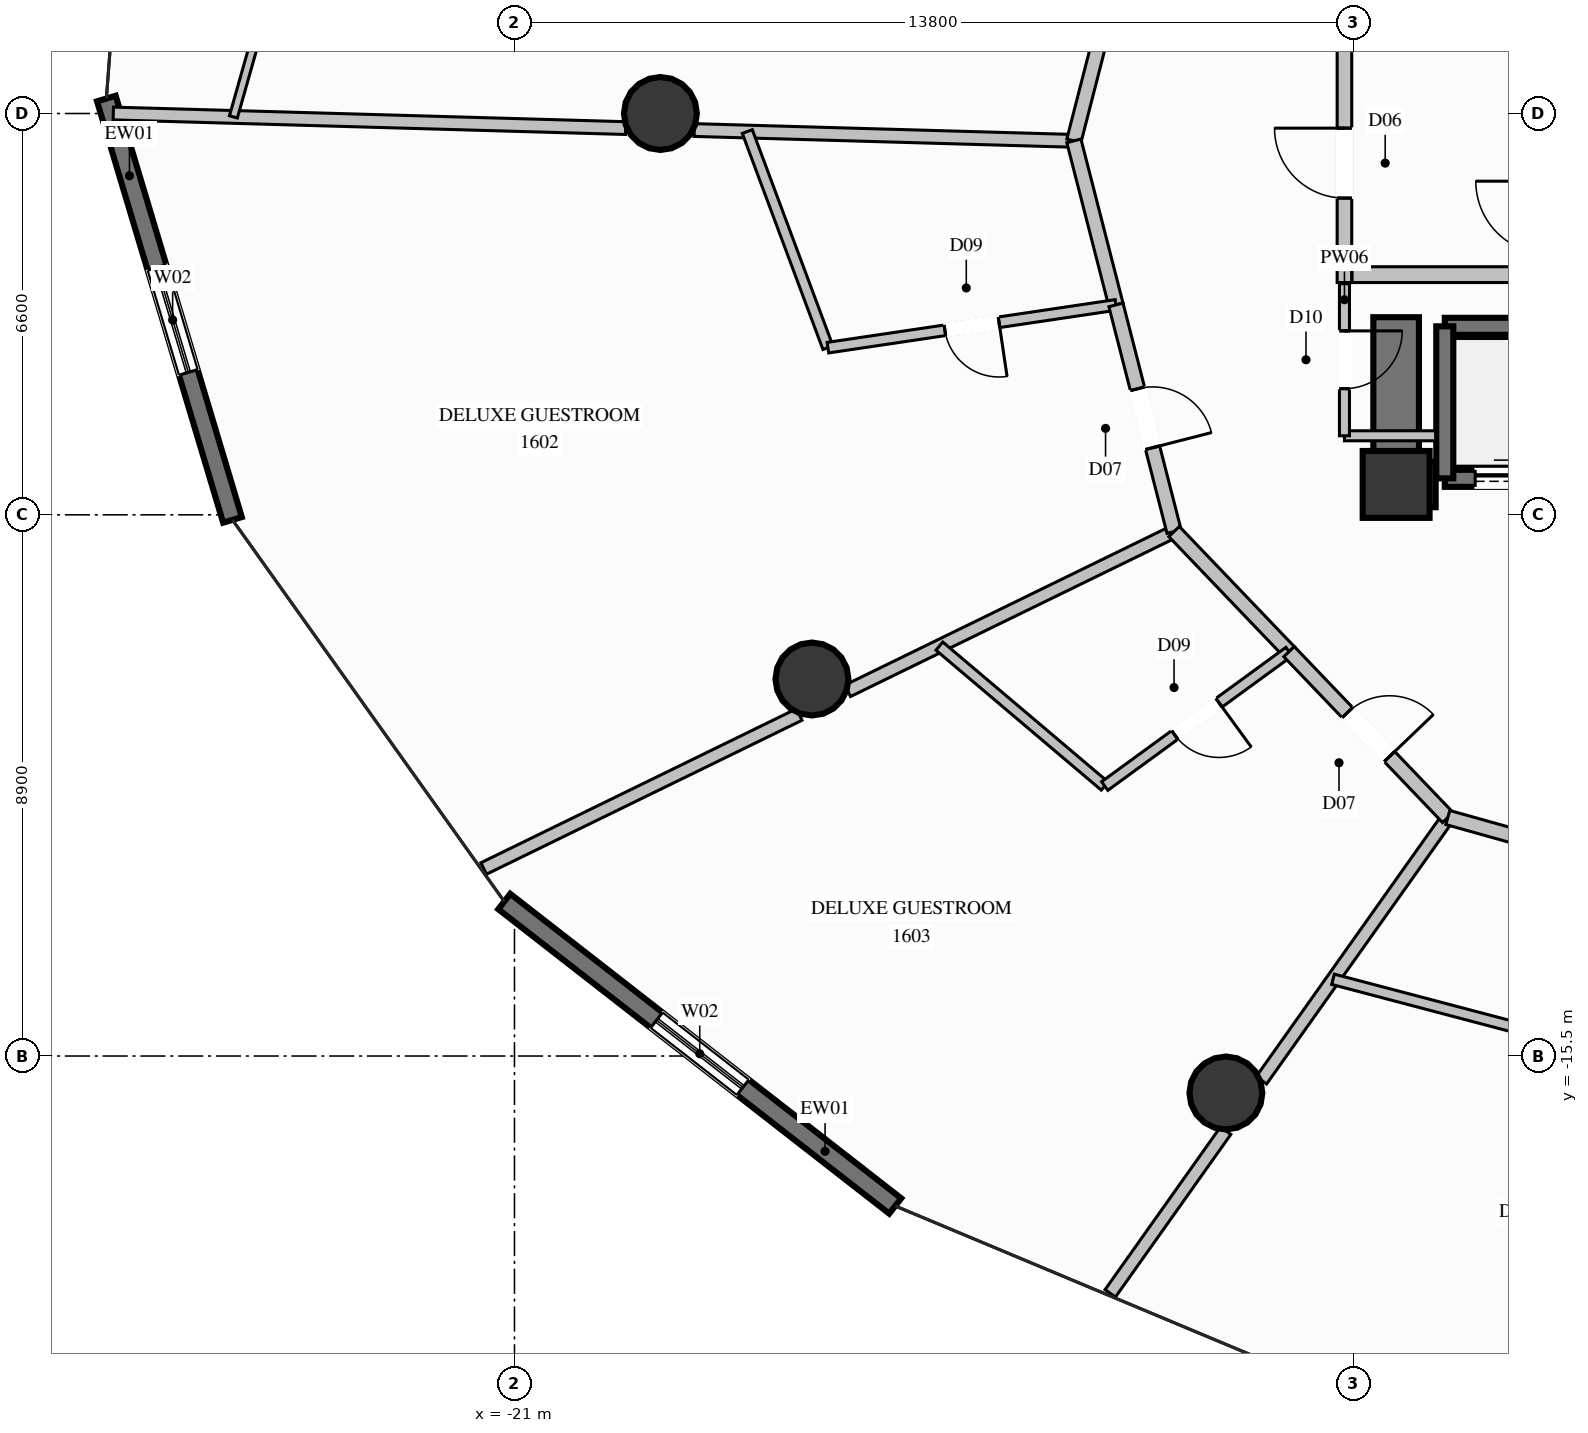
"""IFC4 building model, lengths in metres.
Left out: names, types, materials, properties, quantities, classifications, styles, units other than length and angle.
Written with IfcOpenShell. Run it as: python <this file> out.ifc"""

import sys

from ifc_helpers import new_model, si_unit, direction, frame, frame_2d, origin, origin_2d, place, context, subcontext, project, spatial, rectangle, circle, extrude, element, fill, save


model = new_model("IFC4")
c1 = context("Model", 3, precision=1e-05, world=origin(), true_north=direction((0.0, 1.0)))
c2 = subcontext(c1, "Body", "Model", "MODEL_VIEW")
j1 = project(units=[si_unit("LENGTHUNIT", "METRE"), si_unit("PLANEANGLEUNIT", "RADIAN")], contexts=[c1])
p1 = place(None, origin())
s1 = spatial("IfcSite", under=j1, at=p1, CompositionType="ELEMENT")
p2 = place(p1, origin())
s2 = spatial("IfcBuilding", under=s1, at=p2, CompositionType="ELEMENT")
p3 = place(p2, frame((0.0, 0.0, 60.8)))
s3 = spatial("IfcBuildingStorey", under=s2, at=p3, CompositionType="ELEMENT", Elevation=60.8)
p4 = place(p3, frame((-6.5, -6.1, 0.0), z_axis=(0.0, 0.0, 1.0), x_axis=(1.0, 0.0, 0.0)))
e1 = element("IfcColumn", 1, at=p4, inside=s3, PredefinedType="COLUMN", context=c2, shape_type="SweptSolid", body=[
    extrude(rectangle(XDim=1.1, YDim=1.1, at=origin_2d()), origin(), (0.0, 0.0, 1.0), 3.6),
])
p5 = place(p3, frame((-6.125, -6.1, 0.0), z_axis=(0.0, 0.0, 1.0), x_axis=(1.0, 0.0, 0.0)))
e2 = element("IfcWall", 2, at=p5, inside=s3, PredefinedType="SHEAR", context=c2, shape_type="SweptSolid", body=[
    extrude(rectangle(XDim=0.275, YDim=0.75, at=frame_2d((0.137, 0.0))), origin(), (0.0, 0.0, 1.0), 3.6),
])
p6 = place(p3, frame((-6.5, -6.475, 0.0), z_axis=(0.0, 0.0, 1.0), x_axis=(0.0, 1.0, 0.0)))
e3 = element("IfcWall", 3, at=p6, inside=s3, PredefinedType="SHEAR", context=c2, shape_type="SweptSolid", body=[
    extrude(rectangle(XDim=3.125, YDim=0.75, at=frame_2d((1.562, 0.0))), origin(), (0.0, 0.0, 1.0), 3.6),
])
for number, where, z_axis, x_axis in (
    (4, (-18.6, 0.0, 0.0), (0.0, 0.0, 1.0), (1.0, 0.0, 0.0)),
    (5, (-16.108, -9.3, 0.0), (0.0, 0.0, 1.0), (1.0, 0.0, 0.0)),
    (6, (-9.3, -16.108, 0.0), (0.0, 0.0, 1.0), (1.0, 0.0, 0.0)),
):
    element("IfcColumn", number, at=place(p3, frame(where, z_axis=z_axis, x_axis=x_axis)), inside=s3, PredefinedType="COLUMN", context=c2, shape_type="SweptSolid", body=[
        extrude(circle(Radius=0.6, at=origin_2d()), origin(), (0.0, 0.0, 1.0), 3.6),
    ])
p7 = place(p3, frame((-25.638, -6.683, 0.0), z_axis=(0.0, 0.0, 1.0), x_axis=(-0.286740873851, 0.958008179121, 0.0)))
e7 = element("IfcWall", 7, at=p7, inside=s3, PredefinedType="SOLIDWALL", context=c2, shape_type="SweptSolid", body=[
    extrude(rectangle(XDim=7.233, YDim=0.32, at=frame_2d((3.616, 0.0))), origin(), (0.0, 0.0, 1.0), 3.34),
])
p8 = place(p7, frame((2.532, 0.0, 0.35)))
e8 = element("IfcOpeningElement", 8, at=p8, cuts=e7, PredefinedType="OPENING", context=c2, shape_type="SweptSolid", body=[
    extrude(rectangle(XDim=1.8, YDim=2.6, at=frame_2d((0.9, 1.3))), frame((0.0, 0.17, 0.0), z_axis=(0.0, -1.0, 0.0), x_axis=(1.0, 0.0, 0.0)), (0.0, 0.0, 1.0), 0.34),
])
p9 = place(p3, frame((-14.738, -17.966, 0.0), z_axis=(0.0, 0.0, 1.0), x_axis=(-0.788993974252, 0.614400934728, 0.0)))
e9 = element("IfcWall", 9, at=p9, inside=s3, PredefinedType="SOLIDWALL", context=c2, shape_type="SweptSolid", body=[
    extrude(rectangle(XDim=8.149, YDim=0.32, at=frame_2d((4.075, 0.0))), origin(), (0.0, 0.0, 1.0), 3.34),
])
p10 = place(p9, frame((3.175, 0.0, 0.35)))
e10 = element("IfcOpeningElement", 10, at=p10, cuts=e9, PredefinedType="OPENING", context=c2, shape_type="SweptSolid", body=[
    extrude(rectangle(XDim=1.8, YDim=2.6, at=frame_2d((0.9, 1.3))), frame((0.0, 0.17, 0.0), z_axis=(0.0, -1.0, 0.0), x_axis=(1.0, 0.0, 0.0)), (0.0, 0.0, 1.0), 0.34),
])
p11 = place(p3, frame((-5.7, -6.0, 0.0), z_axis=(0.0, 0.0, 1.0), x_axis=(1.0, 0.0, 0.0)))
e11 = element("IfcWall", 11, at=p11, inside=s3, PredefinedType="SOLIDWALL", context=c2, shape_type="SweptSolid", body=[
    extrude(rectangle(XDim=2.1, YDim=0.28, at=frame_2d((1.05, 0.0))), origin(), (0.0, 0.0, 1.0), 3.34),
])
p12 = place(p11, frame((0.5, 0.0, 0.0)))
e12 = element("IfcOpeningElement", 12, at=p12, cuts=e11, PredefinedType="OPENING", context=c2, shape_type="SweptSolid", body=[
    extrude(rectangle(XDim=1.1, YDim=2.2, at=frame_2d((0.55, 1.1))), frame((0.0, 0.15, 0.0), z_axis=(0.0, -1.0, 0.0), x_axis=(1.0, 0.0, 0.0)), (0.0, 0.0, 1.0), 0.3),
])
p13 = place(p3, frame((-3.6, -3.5, 0.0), z_axis=(0.0, 0.0, 1.0), x_axis=(-1.0, 0.0, 0.0)))
e13 = element("IfcWall", 13, at=p13, inside=s3, PredefinedType="SOLIDWALL", context=c2, shape_type="SweptSolid", body=[
    extrude(rectangle(XDim=2.1, YDim=0.28, at=frame_2d((1.05, 0.0))), origin(), (0.0, 0.0, 1.0), 3.34),
])
p14 = place(p3, frame((-5.7, -3.5, 0.0), z_axis=(0.0, 0.0, 1.0), x_axis=(0.0, -1.0, 0.0)))
e14 = element("IfcWall", 14, at=p14, inside=s3, PredefinedType="SOLIDWALL", context=c2, shape_type="SweptSolid", body=[
    extrude(rectangle(XDim=2.5, YDim=0.28, at=frame_2d((1.25, 0.0))), origin(), (0.0, 0.0, 1.0), 3.34),
])
p15 = place(p3, frame((-7.35, -2.78, 0.0), z_axis=(0.0, 0.0, 1.0), x_axis=(0.0, 1.0, 0.0)))
e15 = element("IfcWall", 15, at=p15, inside=s3, PredefinedType="PARTITIONING", context=c2, shape_type="SweptSolid", body=[
    extrude(rectangle(XDim=5.12, YDim=0.24, at=frame_2d((2.56, 0.0))), origin(), (0.0, 0.0, 1.0), 2.425),
])
p16 = place(p15, frame((1.389, 0.0, 0.0)))
e16 = element("IfcOpeningElement", 16, at=p16, cuts=e15, PredefinedType="OPENING", context=c2, shape_type="SweptSolid", body=[
    extrude(rectangle(XDim=1.15, YDim=2.2, at=frame_2d((0.575, 1.1))), frame((0.0, 0.13, 0.0), z_axis=(0.0, -1.0, 0.0), x_axis=(1.0, 0.0, 0.0)), (0.0, 0.0, 1.0), 0.26),
])
p17 = place(p3, frame((-7.225, -2.65, 0.0), z_axis=(0.0, 0.0, 1.0), x_axis=(1.0, 0.0, 0.0)))
e17 = element("IfcWall", 17, at=p17, inside=s3, PredefinedType="PARTITIONING", context=c2, shape_type="SweptSolid", body=[
    extrude(rectangle(XDim=3.095, YDim=0.26, at=frame_2d((1.548, 0.0))), origin(), (0.0, 0.0, 1.0), 3.34),
])
p18 = place(p3, frame((-7.35, -5.3, 0.0), z_axis=(0.0, 0.0, 1.0), x_axis=(1.0, 0.0, 0.0)))
e18 = element("IfcWall", 18, at=p18, inside=s3, PredefinedType="PARTITIONING", context=c2, shape_type="SweptSolid", body=[
    extrude(rectangle(XDim=1.5, YDim=0.165, at=frame_2d((0.75, 0.0))), origin(), (0.0, 0.0, 1.0), 2.425),
])
p19 = place(p3, frame((-7.35, -2.8, 0.0), z_axis=(0.0, 0.0, 1.0), x_axis=(0.0, -1.0, 0.0)))
e19 = element("IfcWall", 19, at=p19, inside=s3, PredefinedType="PARTITIONING", context=c2, shape_type="SweptSolid", body=[
    extrude(rectangle(XDim=2.5, YDim=0.165, at=frame_2d((1.25, 0.0))), origin(), (0.0, 0.0, 1.0), 3.34),
])
p20 = place(p19, frame((0.775, 0.0, 0.0)))
e20 = element("IfcOpeningElement", 20, at=p20, cuts=e19, PredefinedType="OPENING", context=c2, shape_type="SweptSolid", body=[
    extrude(rectangle(XDim=0.95, YDim=2.1, at=frame_2d((0.475, 1.05))), frame((0.0, 0.093, 0.0), z_axis=(0.0, -1.0, 0.0), x_axis=(1.0, 0.0, 0.0)), (0.0, 0.0, 1.0), 0.185),
])
p21 = place(p3, frame((-11.8, -0.45, 0.0), z_axis=(0.0, 0.0, 1.0), x_axis=(-0.999593870063, 0.02849727939, 0.0)))
e21 = element("IfcWall", 21, at=p21, inside=s3, PredefinedType="PARTITIONING", context=c2, shape_type="SweptSolid", body=[
    extrude(rectangle(XDim=6.245, YDim=0.21, at=frame_2d((3.123, 0.0))), origin(), (0.0, 0.0, 1.0), 2.709),
])
p22 = place(p3, frame((-19.172, -0.24, 0.0), z_axis=(0.0, 0.0, 1.0), x_axis=(-0.999594610371, 0.028471299896, 0.0)))
e22 = element("IfcWall", 22, at=p22, inside=s3, PredefinedType="PARTITIONING", context=c2, shape_type="SweptSolid", body=[
    extrude(rectangle(XDim=8.429, YDim=0.21, at=frame_2d((4.215, 0.0))), origin(), (0.0, 0.0, 1.0), 3.34),
])
p23 = place(p3, frame((-10.152, -6.875, 0.0), z_axis=(0.0, 0.0, 1.0), x_axis=(-0.898710680371, -0.438542031039, 0.0)))
e23 = element("IfcWall", 23, at=p23, inside=s3, PredefinedType="PARTITIONING", context=c2, shape_type="SweptSolid", body=[
    extrude(rectangle(XDim=5.972, YDim=0.21, at=frame_2d((2.986, 0.0))), origin(), (0.0, 0.0, 1.0), 2.709),
])
p24 = place(p3, frame((-16.317, -9.884, 0.0), z_axis=(0.0, 0.0, 1.0), x_axis=(-0.898723333694, -0.438516099447, 0.0)))
e24 = element("IfcWall", 24, at=p24, inside=s3, PredefinedType="PARTITIONING", context=c2, shape_type="SweptSolid", body=[
    extrude(rectangle(XDim=5.774, YDim=0.21, at=frame_2d((2.887, 0.0))), origin(), (0.0, 0.0, 1.0), 3.34),
])
p25 = place(p3, frame((-5.65, -11.578, 0.0), z_axis=(0.0, 0.0, 1.0), x_axis=(-0.578698566801, -0.815541518736, 0.0)))
e25 = element("IfcWall", 25, at=p25, inside=s3, PredefinedType="PARTITIONING", context=c2, shape_type="SweptSolid", body=[
    extrude(rectangle(XDim=5.298, YDim=0.21, at=frame_2d((2.649, 0.0))), origin(), (0.0, 0.0, 1.0), 2.709),
])
p26 = place(p3, frame((-9.304, -16.728, 0.0), z_axis=(0.0, 0.0, 1.0), x_axis=(-0.578651190497, -0.815575134329, 0.0)))
e26 = element("IfcWall", 26, at=p26, inside=s3, PredefinedType="PARTITIONING", context=c2, shape_type="SweptSolid", body=[
    extrude(rectangle(XDim=3.28, YDim=0.21, at=frame_2d((1.64, 0.0))), origin(), (0.0, 0.0, 1.0), 3.34),
])
p27 = place(p3, frame((-10.152, 5.975, 0.0), z_axis=(0.0, 0.0, 1.0), x_axis=(-0.248446193127, -0.968645698447, 0.0)))
e27 = element("IfcWall", 27, at=p27, inside=s3, PredefinedType="PARTITIONING", context=c2, shape_type="SweptSolid", body=[
    extrude(rectangle(XDim=6.633, YDim=0.24, at=frame_2d((3.316, 0.0))), origin(), (0.0, 0.0, 1.0), 3.34),
])
p28 = place(p3, frame((-22.006, 12.72, 0.0), z_axis=(0.0, 0.0, 1.0), x_axis=(-0.272401157448, -0.962183771127, 0.0)))
e28 = element("IfcWall", 28, at=p28, inside=s3, PredefinedType="PARTITIONING", context=c2, shape_type="SweptSolid", body=[
    extrude(rectangle(XDim=13.278, YDim=0.135, at=frame_2d((6.639, 0.0))), origin(), (0.0, 0.0, 1.0), 3.34),
])
p29 = place(p28, frame((6.164, 0.0, 0.0)))
e29 = element("IfcOpeningElement", 29, at=p29, cuts=e28, PredefinedType="OPENING", context=c2, shape_type="SweptSolid", body=[
    extrude(rectangle(XDim=0.95, YDim=2.1, at=frame_2d((0.475, 1.05))), frame((0.0, 0.078, 0.0), z_axis=(0.0, -1.0, 0.0), x_axis=(1.0, 0.0, 0.0)), (0.0, 0.0, 1.0), 0.155),
])
p30 = place(p3, frame((-11.8, -0.45, 0.0), z_axis=(0.0, 0.0, 1.0), x_axis=(0.248491333658, -0.968634119313, 0.0)))
e30 = element("IfcWall", 30, at=p30, inside=s3, PredefinedType="PARTITIONING", context=c2, shape_type="SweptSolid", body=[
    extrude(rectangle(XDim=2.785, YDim=0.24, at=frame_2d((1.393, 0.0))), origin(), (0.0, 0.0, 1.0), 3.34),
])
p31 = place(p3, frame((-17.171, -0.297, 0.0), z_axis=(0.0, 0.0, 1.0), x_axis=(0.349550044584, -0.936917694534, 0.0)))
e31 = element("IfcWall", 31, at=p31, inside=s3, PredefinedType="PLUMBINGWALL", context=c2, shape_type="SweptSolid", body=[
    extrude(rectangle(XDim=3.793, YDim=0.175, at=frame_2d((1.896, 0.0))), origin(), (0.0, 0.0, 1.0), 3.34),
])
p32 = place(p3, frame((-11.108, -3.148, 0.0), z_axis=(0.0, 0.0, 1.0), x_axis=(-0.989162914361, -0.146822099333, 0.0)))
e32 = element("IfcWall", 32, at=p32, inside=s3, PredefinedType="PLUMBINGWALL", context=c2, shape_type="SweptSolid", body=[
    extrude(rectangle(XDim=4.789, YDim=0.175, at=frame_2d((2.395, 0.0))), origin(), (0.0, 0.0, 1.0), 3.34),
])
p33 = place(p32, frame((1.944, 0.0, 0.0)))
e33 = element("IfcOpeningElement", 33, at=p33, cuts=e32, PredefinedType="OPENING", context=c2, shape_type="SweptSolid", body=[
    extrude(rectangle(XDim=0.9, YDim=2.1, at=frame_2d((0.45, 1.05))), frame((0.0, 0.098, 0.0), z_axis=(0.0, -1.0, 0.0), x_axis=(1.0, 0.0, 0.0)), (0.0, 0.0, 1.0), 0.195),
])
p34 = place(p3, frame((-11.108, -3.148, 0.0), z_axis=(0.0, 0.0, 1.0), x_axis=(0.248413515056, -0.9686540794, 0.0)))
e34 = element("IfcWall", 34, at=p34, inside=s3, PredefinedType="PARTITIONING", context=c2, shape_type="SweptSolid", body=[
    extrude(rectangle(XDim=3.848, YDim=0.24, at=frame_2d((1.924, 0.0))), origin(), (0.0, 0.0, 1.0), 3.34),
])
p35 = place(p34, frame((1.424, 0.0, 0.0)))
e35 = element("IfcOpeningElement", 35, at=p35, cuts=e34, PredefinedType="OPENING", context=c2, shape_type="SweptSolid", body=[
    extrude(rectangle(XDim=1.0, YDim=2.2, at=frame_2d((0.5, 1.1))), frame((0.0, 0.13, 0.0), z_axis=(0.0, -1.0, 0.0), x_axis=(1.0, 0.0, 0.0)), (0.0, 0.0, 1.0), 0.26),
])
p36 = place(p3, frame((-10.152, -6.875, 0.0), z_axis=(0.0, 0.0, 1.0), x_axis=(0.691583392139, -0.722296623083, 0.0)))
e36 = element("IfcWall", 36, at=p36, inside=s3, PredefinedType="PARTITIONING", context=c2, shape_type="SweptSolid", body=[
    extrude(rectangle(XDim=2.734, YDim=0.24, at=frame_2d((1.367, 0.0))), origin(), (0.0, 0.0, 1.0), 3.34),
])
p37 = place(p3, frame((-14.012, -8.759, 0.0), z_axis=(0.0, 0.0, 1.0), x_axis=(0.763339486507, -0.645997545149, 0.0)))
e37 = element("IfcWall", 37, at=p37, inside=s3, PredefinedType="PLUMBINGWALL", context=c2, shape_type="SweptSolid", body=[
    extrude(rectangle(XDim=3.562, YDim=0.175, at=frame_2d((1.781, 0.0))), origin(), (0.0, 0.0, 1.0), 3.34),
])
p38 = place(p3, frame((-8.261, -8.85, 0.0), z_axis=(0.0, 0.0, 1.0), x_axis=(-0.808116582647, -0.589022570748, 0.0)))
e38 = element("IfcWall", 38, at=p38, inside=s3, PredefinedType="PLUMBINGWALL", context=c2, shape_type="SweptSolid", body=[
    extrude(rectangle(XDim=3.752, YDim=0.175, at=frame_2d((1.876, 0.0))), origin(), (0.0, 0.0, 1.0), 3.34),
])
p39 = place(p38, frame((1.426, 0.0, 0.0)))
e39 = element("IfcOpeningElement", 39, at=p39, cuts=e38, PredefinedType="OPENING", context=c2, shape_type="SweptSolid", body=[
    extrude(rectangle(XDim=0.9, YDim=2.1, at=frame_2d((0.45, 1.05))), frame((0.0, 0.098, 0.0), z_axis=(0.0, -1.0, 0.0), x_axis=(1.0, 0.0, 0.0)), (0.0, 0.0, 1.0), 0.195),
])
p40 = place(p3, frame((-8.261, -8.85, 0.0), z_axis=(0.0, 0.0, 1.0), x_axis=(0.691485368968, -0.722390465402, 0.0)))
e40 = element("IfcWall", 40, at=p40, inside=s3, PredefinedType="PARTITIONING", context=c2, shape_type="SweptSolid", body=[
    extrude(rectangle(XDim=3.776, YDim=0.24, at=frame_2d((1.888, 0.0))), origin(), (0.0, 0.0, 1.0), 3.34),
])
p41 = place(p40, frame((1.388, 0.0, 0.0)))
e41 = element("IfcOpeningElement", 41, at=p41, cuts=e40, PredefinedType="OPENING", context=c2, shape_type="SweptSolid", body=[
    extrude(rectangle(XDim=1.0, YDim=2.2, at=frame_2d((0.5, 1.1))), frame((0.0, 0.13, 0.0), z_axis=(0.0, -1.0, 0.0), x_axis=(1.0, 0.0, 0.0)), (0.0, 0.0, 1.0), 0.26),
])
p42 = place(p3, frame((-5.65, -11.578, 0.0), z_axis=(0.0, 0.0, 1.0), x_axis=(0.96297347206, -0.269596164862, 0.0)))
e42 = element("IfcWall", 42, at=p42, inside=s3, PredefinedType="PARTITIONING", context=c2, shape_type="SweptSolid", body=[
    extrude(rectangle(XDim=2.682, YDim=0.24, at=frame_2d((1.341, 0.0))), origin(), (0.0, 0.0, 1.0), 3.34),
])
p43 = place(p3, frame((-7.538, -14.238, 0.0), z_axis=(0.0, 0.0, 1.0), x_axis=(0.96699769845, -0.254785107872, 0.0)))
e43 = element("IfcWall", 43, at=p43, inside=s3, PredefinedType="PLUMBINGWALL", context=c2, shape_type="SweptSolid", body=[
    extrude(rectangle(XDim=3.418, YDim=0.175, at=frame_2d((1.709, 0.0))), origin(), (0.0, 0.0, 1.0), 3.34),
])
p44 = place(p8, origin())
e44 = element("IfcWindow", 44, at=p44, inside=s3, PartitioningType="SINGLE_PANEL", PredefinedType="WINDOW", context=c2, shape_type="SweptSolid", body=[
    extrude(rectangle(XDim=1.8, YDim=2.6, at=frame_2d((0.9, 1.3))), frame((0.0, 0.03, 0.0), z_axis=(0.0, -1.0, 0.0), x_axis=(1.0, 0.0, 0.0)), (0.0, 0.0, 1.0), 0.06),
])
fill(e8, e44)
p45 = place(p10, origin())
e45 = element("IfcWindow", 45, at=p45, inside=s3, PartitioningType="SINGLE_PANEL", PredefinedType="WINDOW", context=c2, shape_type="SweptSolid", body=[
    extrude(rectangle(XDim=1.8, YDim=2.6, at=frame_2d((0.9, 1.3))), frame((0.0, 0.03, 0.0), z_axis=(0.0, -1.0, 0.0), x_axis=(1.0, 0.0, 0.0)), (0.0, 0.0, 1.0), 0.06),
])
fill(e10, e45)
p46 = place(p12, origin())
e46 = element("IfcDoor", 46, at=p46, inside=s3, OperationType="SLIDING_TO_LEFT", PredefinedType="DOOR", context=c2, shape_type="SweptSolid", body=[
    extrude(rectangle(XDim=1.1, YDim=2.2, at=frame_2d((0.55, 1.1))), frame((0.0, 0.025, 0.0), z_axis=(0.0, -1.0, 0.0), x_axis=(1.0, 0.0, 0.0)), (0.0, 0.0, 1.0), 0.05),
])
fill(e12, e46)
p47 = place(p16, origin())
e47 = element("IfcDoor", 47, at=p47, inside=s3, OperationType="SINGLE_SWING_RIGHT", PredefinedType="DOOR", context=c2, shape_type="SweptSolid", body=[
    extrude(rectangle(XDim=1.15, YDim=2.2, at=frame_2d((0.575, 1.1))), frame((0.0, 0.025, 0.0), z_axis=(0.0, -1.0, 0.0), x_axis=(1.0, 0.0, 0.0)), (0.0, 0.0, 1.0), 0.05),
])
fill(e16, e47)
p48 = place(p20, origin())
e48 = element("IfcDoor", 48, at=p48, inside=s3, OperationType="SINGLE_SWING_LEFT", PredefinedType="DOOR", context=c2, shape_type="SweptSolid", body=[
    extrude(rectangle(XDim=0.95, YDim=2.1, at=frame_2d((0.475, 1.05))), frame((0.0, 0.025, 0.0), z_axis=(0.0, -1.0, 0.0), x_axis=(1.0, 0.0, 0.0)), (0.0, 0.0, 1.0), 0.05),
])
fill(e20, e48)
p49 = place(p33, origin())
e49 = element("IfcDoor", 49, at=p49, inside=s3, OperationType="SINGLE_SWING_LEFT", PredefinedType="DOOR", context=c2, shape_type="SweptSolid", body=[
    extrude(rectangle(XDim=0.9, YDim=2.1, at=frame_2d((0.45, 1.05))), frame((0.0, 0.025, 0.0), z_axis=(0.0, -1.0, 0.0), x_axis=(1.0, 0.0, 0.0)), (0.0, 0.0, 1.0), 0.05),
])
fill(e33, e49)
p50 = place(p35, origin())
e50 = element("IfcDoor", 50, at=p50, inside=s3, OperationType="SINGLE_SWING_RIGHT", PredefinedType="DOOR", context=c2, shape_type="SweptSolid", body=[
    extrude(rectangle(XDim=1.0, YDim=2.2, at=frame_2d((0.5, 1.1))), frame((0.0, 0.025, 0.0), z_axis=(0.0, -1.0, 0.0), x_axis=(1.0, 0.0, 0.0)), (0.0, 0.0, 1.0), 0.05),
])
fill(e35, e50)
p51 = place(p39, origin())
e51 = element("IfcDoor", 51, at=p51, inside=s3, OperationType="SINGLE_SWING_LEFT", PredefinedType="DOOR", context=c2, shape_type="SweptSolid", body=[
    extrude(rectangle(XDim=0.9, YDim=2.1, at=frame_2d((0.45, 1.05))), frame((0.0, 0.025, 0.0), z_axis=(0.0, -1.0, 0.0), x_axis=(1.0, 0.0, 0.0)), (0.0, 0.0, 1.0), 0.05),
])
fill(e39, e51)
p52 = place(p41, origin())
e52 = element("IfcDoor", 52, at=p52, inside=s3, OperationType="SINGLE_SWING_RIGHT", PredefinedType="DOOR", context=c2, shape_type="SweptSolid", body=[
    extrude(rectangle(XDim=1.0, YDim=2.2, at=frame_2d((0.5, 1.1))), frame((0.0, 0.025, 0.0), z_axis=(0.0, -1.0, 0.0), x_axis=(1.0, 0.0, 0.0)), (0.0, 0.0, 1.0), 0.05),
])
fill(e41, e52)
save(model, sys.argv[1])
